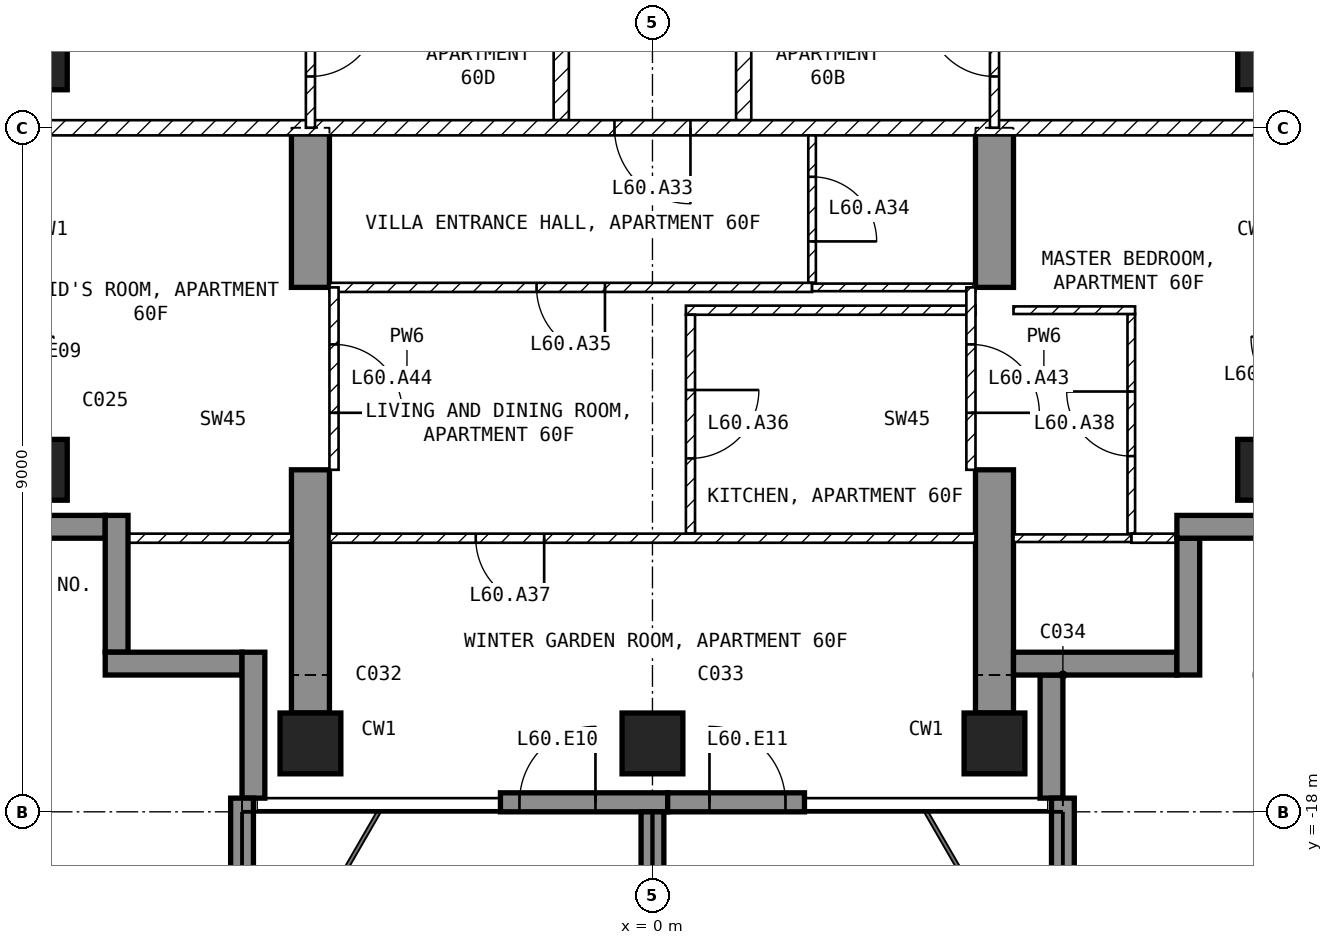
"""IFC4 building model, lengths in metres.
Left out: names, types, materials, properties, quantities, classifications, styles, units other than length and angle.
Written with IfcOpenShell. Run it as: python <this file> out.ifc"""

import sys

from ifc_helpers import new_model, si_unit, direction, frame, frame_2d, origin, origin_2d, place, context, subcontext, project, spatial, polyline, rectangle, outline, extrude, element, fill, save


model = new_model("IFC4")
c1 = context("Model", 3, precision=1e-05, world=origin(), true_north=direction((0.0, 1.0)))
c2 = subcontext(c1, "Body", "Model", "MODEL_VIEW")
j1 = project(units=[si_unit("LENGTHUNIT", "METRE"), si_unit("PLANEANGLEUNIT", "RADIAN")], contexts=[c1])
p1 = place(None, origin())
s1 = spatial("IfcSite", under=j1, at=p1, CompositionType="ELEMENT")
p2 = place(p1, origin())
s2 = spatial("IfcBuilding", under=s1, at=p2, CompositionType="ELEMENT")
p3 = place(p2, frame((0.0, 0.0, 239.5)))
s3 = spatial("IfcBuildingStorey", under=s2, at=p3, CompositionType="ELEMENT", Elevation=239.5)
for number, where, z_axis, x_axis in (
    (1, (-8.1, -13.5, -0.25), (0.0, 0.0, 1.0), (1.0, 0.0, 0.0)),
    (2, (-8.1, -8.1, -0.25), (0.0, 0.0, 1.0), (1.0, 0.0, 0.0)),
    (3, (-4.5, -17.1, -0.25), (0.0, 0.0, 1.0), (1.0, 0.0, 0.0)),
    (4, (0.0, -17.1, -0.25), (0.0, 0.0, 1.0), (1.0, 0.0, 0.0)),
    (5, (4.5, -17.1, -0.25), (0.0, 0.0, 1.0), (1.0, 0.0, 0.0)),
    (6, (8.1, -13.5, -0.25), (0.0, 0.0, 1.0), (1.0, 0.0, 0.0)),
    (7, (8.1, -8.1, -0.25), (0.0, 0.0, 1.0), (1.0, 0.0, 0.0)),
):
    element("IfcColumn", number, at=place(p3, frame(where, z_axis=z_axis, x_axis=x_axis)), inside=s3, PredefinedType="COLUMN", context=c2, shape_type="SweptSolid", body=[
        extrude(rectangle(XDim=0.8, YDim=0.8, at=origin_2d()), origin(), (0.0, 0.0, 1.0), 3.5),
    ])
for number, where, z_axis, x_axis in (
    (8, (-4.75, -16.7, -0.25), (1.0, 0.0, 0.0), (0.0, 1.0, 0.0)),
    (9, (4.25, -16.7, -0.25), (1.0, 0.0, 0.0), (0.0, 1.0, 0.0)),
):
    element("IfcWall", number, at=place(p3, frame(where, z_axis=z_axis, x_axis=x_axis)), inside=s3, PredefinedType="SHEAR", context=c2, shape_type="SweptSolid", body=[
        extrude(outline(polyline([(0.0, 0.0), (3.2, 0.0), (3.2, 2.65), (5.6, 2.65), (5.6, 0.0), (7.7, 0.0), (7.7, 3.5), (0.0, 3.5), (0.0, 0.0)])), origin(), (0.0, 0.0, 1.0), 0.5),
    ])
p4 = place(p3, frame((-2.0, -17.875, 0.0), z_axis=(0.0, 0.0, 1.0), x_axis=(1.0, 0.0, 0.0)))
e10 = element("IfcWall", 10, at=p4, inside=s3, PredefinedType="SOLIDWALL", context=c2, shape_type="SweptSolid", body=[
    extrude(rectangle(XDim=2.2, YDim=0.25, at=frame_2d((1.1, 0.0))), origin(), (0.0, 0.0, 1.0), 3.25),
])
p5 = place(p4, frame((0.25, 0.0, 0.0)))
e11 = element("IfcOpeningElement", 11, at=p5, cuts=e10, PredefinedType="OPENING", context=c2, shape_type="SweptSolid", body=[
    extrude(rectangle(XDim=1.0, YDim=2.4, at=frame_2d((0.5, 1.2))), frame((0.0, 0.135, 0.0), z_axis=(0.0, -1.0, 0.0), x_axis=(1.0, 0.0, 0.0)), (0.0, 0.0, 1.0), 0.27),
])
p6 = place(p3, frame((0.2, -17.875, 0.0), z_axis=(0.0, 0.0, 1.0), x_axis=(1.0, 0.0, 0.0)))
e12 = element("IfcWall", 12, at=p6, inside=s3, PredefinedType="SOLIDWALL", context=c2, shape_type="SweptSolid", body=[
    extrude(rectangle(XDim=1.8, YDim=0.25, at=frame_2d((0.9, 0.0))), origin(), (0.0, 0.0, 1.0), 3.25),
])
p7 = place(p6, frame((0.55, 0.0, 0.0)))
e13 = element("IfcOpeningElement", 13, at=p7, cuts=e12, PredefinedType="OPENING", context=c2, shape_type="SweptSolid", body=[
    extrude(rectangle(XDim=1.0, YDim=2.4, at=frame_2d((0.5, 1.2))), frame((0.0, 0.135, 0.0), z_axis=(0.0, -1.0, 0.0), x_axis=(1.0, 0.0, 0.0)), (0.0, 0.0, 1.0), 0.27),
])
p8 = place(p3, frame((5.25, -17.82, 0.0), z_axis=(0.0, 0.0, 1.0), x_axis=(0.0, 1.0, 0.0)))
e14 = element("IfcWall", 14, at=p8, inside=s3, PredefinedType="SOLIDWALL", context=c2, shape_type="SweptSolid", body=[
    extrude(rectangle(XDim=1.62, YDim=0.3, at=frame_2d((0.81, 0.0))), origin(), (0.0, 0.0, 1.0), 3.25),
])
p9 = place(p3, frame((4.75, -16.05, 0.0), z_axis=(0.0, 0.0, 1.0), x_axis=(1.0, 0.0, 0.0)))
e15 = element("IfcWall", 15, at=p9, inside=s3, PredefinedType="SOLIDWALL", context=c2, shape_type="SweptSolid", body=[
    extrude(rectangle(XDim=2.15, YDim=0.3, at=frame_2d((1.075, 0.0))), origin(), (0.0, 0.0, 1.0), 3.25),
])
p10 = place(p3, frame((7.05, -16.2, 0.0), z_axis=(0.0, 0.0, 1.0), x_axis=(0.0, 1.0, 0.0)))
e16 = element("IfcWall", 16, at=p10, inside=s3, PredefinedType="SOLIDWALL", context=c2, shape_type="SweptSolid", body=[
    extrude(rectangle(XDim=1.8, YDim=0.3, at=frame_2d((0.9, 0.0))), origin(), (0.0, 0.0, 1.0), 3.25),
])
p11 = place(p3, frame((6.9, -14.25, 0.0), z_axis=(0.0, 0.0, 1.0), x_axis=(1.0, 0.0, 0.0)))
e17 = element("IfcWall", 17, at=p11, inside=s3, PredefinedType="SOLIDWALL", context=c2, shape_type="SweptSolid", body=[
    extrude(rectangle(XDim=1.85, YDim=0.3, at=frame_2d((0.925, 0.0))), origin(), (0.0, 0.0, 1.0), 3.25),
])
p12 = place(p3, frame((-8.75, -14.25, 0.0), z_axis=(0.0, 0.0, 1.0), x_axis=(1.0, 0.0, 0.0)))
e18 = element("IfcWall", 18, at=p12, inside=s3, PredefinedType="SOLIDWALL", context=c2, shape_type="SweptSolid", body=[
    extrude(rectangle(XDim=1.55, YDim=0.3, at=frame_2d((0.775, 0.0))), origin(), (0.0, 0.0, 1.0), 3.25),
])
p13 = place(p3, frame((-7.05, -14.1, 0.0), z_axis=(0.0, 0.0, 1.0), x_axis=(0.0, -1.0, 0.0)))
e19 = element("IfcWall", 19, at=p13, inside=s3, PredefinedType="SOLIDWALL", context=c2, shape_type="SweptSolid", body=[
    extrude(rectangle(XDim=1.8, YDim=0.3, at=frame_2d((0.9, 0.0))), origin(), (0.0, 0.0, 1.0), 3.25),
])
p14 = place(p3, frame((-7.2, -16.05, 0.0), z_axis=(0.0, 0.0, 1.0), x_axis=(1.0, 0.0, 0.0)))
e20 = element("IfcWall", 20, at=p14, inside=s3, PredefinedType="SOLIDWALL", context=c2, shape_type="SweptSolid", body=[
    extrude(rectangle(XDim=1.8, YDim=0.3, at=frame_2d((0.9, 0.0))), origin(), (0.0, 0.0, 1.0), 3.25),
])
p15 = place(p3, frame((-5.25, -15.9, 0.0), z_axis=(0.0, 0.0, 1.0), x_axis=(0.0, -1.0, 0.0)))
e21 = element("IfcWall", 21, at=p15, inside=s3, PredefinedType="SOLIDWALL", context=c2, shape_type="SweptSolid", body=[
    extrude(rectangle(XDim=1.92, YDim=0.3, at=frame_2d((0.96, 0.0))), origin(), (0.0, 0.0, 1.0), 3.25),
])
p16 = place(p3, frame((-5.4, -17.82, 0.0), z_axis=(0.0, 0.0, 1.0), x_axis=(0.0, -1.0, 0.0)))
e22 = element("IfcWall", 22, at=p16, inside=s3, PredefinedType="SOLIDWALL", context=c2, shape_type="SweptSolid", body=[
    extrude(rectangle(XDim=2.88, YDim=0.3, at=frame_2d((1.44, 0.0))), origin(), (0.0, 0.0, 1.0), 3.25),
])
p17 = place(p3, frame((0.0, -18.0, 0.0), z_axis=(0.0, 0.0, 1.0), x_axis=(0.0, -1.0, 0.0)))
e23 = element("IfcWall", 23, at=p17, inside=s3, PredefinedType="SOLIDWALL", context=c2, shape_type="SweptSolid", body=[
    extrude(rectangle(XDim=2.7, YDim=0.3, at=frame_2d((1.35, 0.0))), origin(), (0.0, 0.0, 1.0), 3.25),
])
p18 = place(p3, frame((5.4, -17.82, 0.0), z_axis=(0.0, 0.0, 1.0), x_axis=(0.0, -1.0, 0.0)))
e24 = element("IfcWall", 24, at=p18, inside=s3, PredefinedType="SOLIDWALL", context=c2, shape_type="SweptSolid", body=[
    extrude(rectangle(XDim=2.88, YDim=0.3, at=frame_2d((1.44, 0.0))), origin(), (0.0, 0.0, 1.0), 3.25),
])
for number, where, z_axis, x_axis in (
    (25, (1.2, -4.6, 0.0), (0.0, 0.0, 1.0), (0.0, -1.0, 0.0)),
    (26, (-1.2, -8.9, 0.0), (0.0, 0.0, 1.0), (0.0, 1.0, 0.0)),
):
    element("IfcWall", number, at=place(p3, frame(where, z_axis=z_axis, x_axis=x_axis)), inside=s3, PredefinedType="PARTITIONING", context=c2, shape_type="SweptSolid", body=[
        extrude(rectangle(XDim=4.3, YDim=0.2, at=frame_2d((2.15, 0.0))), origin(), (0.0, 0.0, 1.0), 3.25),
    ])
p19 = place(p3, frame((8.92, -9.0, 0.0), z_axis=(0.0, 0.0, 1.0), x_axis=(-1.0, 0.0, 0.0)))
e27 = element("IfcWall", 27, at=p19, inside=s3, PredefinedType="PARTITIONING", context=c2, shape_type="SweptSolid", body=[
    extrude(rectangle(XDim=17.84, YDim=0.2, at=frame_2d((8.92, 0.0))), origin(), (0.0, 0.0, 1.0), 3.25),
])
p20 = place(p19, frame((8.42, 0.0, 0.0)))
e28 = element("IfcOpeningElement", 28, at=p20, cuts=e27, PredefinedType="OPENING", context=c2, shape_type="SweptSolid", body=[
    extrude(rectangle(XDim=1.0, YDim=2.1, at=frame_2d((0.5, 1.05))), frame((0.0, 0.11, 0.0), z_axis=(0.0, -1.0, 0.0), x_axis=(1.0, 0.0, 0.0)), (0.0, 0.0, 1.0), 0.22),
])
p21 = place(p3, frame((4.5, -9.0, 0.0), z_axis=(0.0, 0.0, 1.0), x_axis=(0.0, 1.0, 0.0)))
e29 = element("IfcWall", 29, at=p21, inside=s3, PredefinedType="PARTITIONING", context=c2, shape_type="SweptSolid", body=[
    extrude(rectangle(XDim=2.25, YDim=0.12, at=frame_2d((1.125, 0.0))), origin(), (0.0, 0.0, 1.0), 3.25),
])
p22 = place(p21, frame((0.675, 0.0, 0.0)))
e30 = element("IfcOpeningElement", 30, at=p22, cuts=e29, PredefinedType="OPENING", context=c2, shape_type="SweptSolid", body=[
    extrude(rectangle(XDim=0.9, YDim=2.1, at=frame_2d((0.45, 1.05))), frame((0.0, 0.07, 0.0), z_axis=(0.0, -1.0, 0.0), x_axis=(1.0, 0.0, 0.0)), (0.0, 0.0, 1.0), 0.14),
])
p23 = place(p3, frame((-4.5, -6.75, 0.0), z_axis=(0.0, 0.0, 1.0), x_axis=(0.0, -1.0, 0.0)))
e31 = element("IfcWall", 31, at=p23, inside=s3, PredefinedType="PARTITIONING", context=c2, shape_type="SweptSolid", body=[
    extrude(rectangle(XDim=2.25, YDim=0.12, at=frame_2d((1.125, 0.0))), origin(), (0.0, 0.0, 1.0), 3.25),
])
p24 = place(p23, frame((0.675, 0.0, 0.0)))
e32 = element("IfcOpeningElement", 32, at=p24, cuts=e31, PredefinedType="OPENING", context=c2, shape_type="SweptSolid", body=[
    extrude(rectangle(XDim=0.9, YDim=2.1, at=frame_2d((0.45, 1.05))), frame((0.0, 0.07, 0.0), z_axis=(0.0, -1.0, 0.0), x_axis=(1.0, 0.0, 0.0)), (0.0, 0.0, 1.0), 0.14),
])
p25 = place(p3, frame((2.1, -9.1, 0.0), z_axis=(0.0, 0.0, 1.0), x_axis=(0.0, -1.0, 0.0)))
e33 = element("IfcWall", 33, at=p25, inside=s3, PredefinedType="PARTITIONING", context=c2, shape_type="SweptSolid", body=[
    extrude(rectangle(XDim=1.94, YDim=0.1, at=frame_2d((0.97, 0.0))), origin(), (0.0, 0.0, 1.0), 3.25),
])
p26 = place(p25, frame((0.545, 0.0, 0.0)))
e34 = element("IfcOpeningElement", 34, at=p26, cuts=e33, PredefinedType="OPENING", context=c2, shape_type="SweptSolid", body=[
    extrude(rectangle(XDim=0.85, YDim=2.1, at=frame_2d((0.425, 1.05))), frame((0.0, 0.06, 0.0), z_axis=(0.0, -1.0, 0.0), x_axis=(1.0, 0.0, 0.0)), (0.0, 0.0, 1.0), 0.12),
])
p27 = place(p3, frame((2.1, -11.1, 0.0), z_axis=(0.0, 0.0, 1.0), x_axis=(-1.0, 0.0, 0.0)))
e35 = element("IfcWall", 35, at=p27, inside=s3, PredefinedType="PARTITIONING", context=c2, shape_type="SweptSolid", body=[
    extrude(rectangle(XDim=6.35, YDim=0.12, at=frame_2d((3.175, 0.0))), origin(), (0.0, 0.0, 1.0), 3.25),
])
p28 = place(p27, frame((2.725, 0.0, 0.0)))
e36 = element("IfcOpeningElement", 36, at=p28, cuts=e35, PredefinedType="OPENING", context=c2, shape_type="SweptSolid", body=[
    extrude(rectangle(XDim=0.9, YDim=2.1, at=frame_2d((0.45, 1.05))), frame((0.0, 0.07, 0.0), z_axis=(0.0, -1.0, 0.0), x_axis=(1.0, 0.0, 0.0)), (0.0, 0.0, 1.0), 0.14),
])
p29 = place(p3, frame((4.25, -11.1, 0.0), z_axis=(0.0, 0.0, 1.0), x_axis=(-1.0, 0.0, 0.0)))
e37 = element("IfcWall", 37, at=p29, inside=s3, PredefinedType="PARTITIONING", context=c2, shape_type="SweptSolid", body=[
    extrude(rectangle(XDim=2.15, YDim=0.1, at=frame_2d((1.075, 0.0))), origin(), (0.0, 0.0, 1.0), 3.25),
])
p30 = place(p3, frame((4.25, -11.4, 0.0), z_axis=(0.0, 0.0, 1.0), x_axis=(-1.0, 0.0, 0.0)))
e38 = element("IfcWall", 38, at=p30, inside=s3, PredefinedType="PARTITIONING", context=c2, shape_type="SweptSolid", body=[
    extrude(rectangle(XDim=3.81, YDim=0.12, at=frame_2d((1.905, 0.0))), origin(), (0.0, 0.0, 1.0), 3.25),
])
p31 = place(p3, frame((0.5, -11.46, 0.0), z_axis=(0.0, 0.0, 1.0), x_axis=(0.0, -1.0, 0.0)))
e39 = element("IfcWall", 39, at=p31, inside=s3, PredefinedType="PARTITIONING", context=c2, shape_type="SweptSolid", body=[
    extrude(rectangle(XDim=2.88, YDim=0.12, at=frame_2d((1.44, 0.0))), origin(), (0.0, 0.0, 1.0), 3.25),
])
p32 = place(p31, frame((0.99, 0.0, 0.0)))
e40 = element("IfcOpeningElement", 40, at=p32, cuts=e39, PredefinedType="OPENING", context=c2, shape_type="SweptSolid", body=[
    extrude(rectangle(XDim=0.9, YDim=2.1, at=frame_2d((0.45, 1.05))), frame((0.0, 0.07, 0.0), z_axis=(0.0, -1.0, 0.0), x_axis=(1.0, 0.0, 0.0)), (0.0, 0.0, 1.0), 0.14),
])
p33 = place(p3, frame((4.25, -14.4, 0.0), z_axis=(0.0, 0.0, 1.0), x_axis=(-1.0, 0.0, 0.0)))
e41 = element("IfcWall", 41, at=p33, inside=s3, PredefinedType="PARTITIONING", context=c2, shape_type="SweptSolid", body=[
    extrude(rectangle(XDim=8.5, YDim=0.12, at=frame_2d((4.25, 0.0))), origin(), (0.0, 0.0, 1.0), 3.25),
])
p34 = place(p33, frame((5.675, 0.0, 0.0)))
e42 = element("IfcOpeningElement", 42, at=p34, cuts=e41, PredefinedType="OPENING", context=c2, shape_type="SweptSolid", body=[
    extrude(rectangle(XDim=0.9, YDim=2.1, at=frame_2d((0.45, 1.05))), frame((0.0, 0.07, 0.0), z_axis=(0.0, -1.0, 0.0), x_axis=(1.0, 0.0, 0.0)), (0.0, 0.0, 1.0), 0.14),
])
p35 = place(p3, frame((6.3, -14.34, 0.0), z_axis=(0.0, 0.0, 1.0), x_axis=(0.0, 1.0, 0.0)))
e43 = element("IfcWall", 43, at=p35, inside=s3, PredefinedType="PARTITIONING", context=c2, shape_type="SweptSolid", body=[
    extrude(rectangle(XDim=2.89, YDim=0.1, at=frame_2d((1.445, 0.0))), origin(), (0.0, 0.0, 1.0), 3.25),
])
p36 = place(p35, frame((1.02, 0.0, 0.0)))
e44 = element("IfcOpeningElement", 44, at=p36, cuts=e43, PredefinedType="OPENING", context=c2, shape_type="SweptSolid", body=[
    extrude(rectangle(XDim=0.85, YDim=2.1, at=frame_2d((0.425, 1.05))), frame((0.0, 0.06, 0.0), z_axis=(0.0, -1.0, 0.0), x_axis=(1.0, 0.0, 0.0)), (0.0, 0.0, 1.0), 0.12),
])
p37 = place(p3, frame((6.35, -11.4, 0.0), z_axis=(0.0, 0.0, 1.0), x_axis=(-1.0, 0.0, 0.0)))
e45 = element("IfcWall", 45, at=p37, inside=s3, PredefinedType="PARTITIONING", context=c2, shape_type="SweptSolid", body=[
    extrude(rectangle(XDim=1.6, YDim=0.1, at=frame_2d((0.8, 0.0))), origin(), (0.0, 0.0, 1.0), 3.25),
])
p38 = place(p3, frame((7.12, -14.4, 0.0), z_axis=(0.0, 0.0, 1.0), x_axis=(-1.0, 0.0, 0.0)))
e46 = element("IfcWall", 46, at=p38, inside=s3, PredefinedType="PARTITIONING", context=c2, shape_type="SweptSolid", body=[
    extrude(rectangle(XDim=0.82, YDim=0.12, at=frame_2d((0.41, 0.0))), origin(), (0.0, 0.0, 1.0), 3.25),
])
p39 = place(p3, frame((6.3, -14.4, 0.0), z_axis=(0.0, 0.0, 1.0), x_axis=(-1.0, 0.0, 0.0)))
e47 = element("IfcWall", 47, at=p39, inside=s3, PredefinedType="PARTITIONING", context=c2, shape_type="SweptSolid", body=[
    extrude(rectangle(XDim=1.55, YDim=0.1, at=frame_2d((0.775, 0.0))), origin(), (0.0, 0.0, 1.0), 3.25),
])
p40 = place(p3, frame((-4.75, -14.4, 0.0), z_axis=(0.0, 0.0, 1.0), x_axis=(-1.0, 0.0, 0.0)))
e48 = element("IfcWall", 48, at=p40, inside=s3, PredefinedType="PARTITIONING", context=c2, shape_type="SweptSolid", body=[
    extrude(rectangle(XDim=2.37, YDim=0.12, at=frame_2d((1.185, 0.0))), origin(), (0.0, 0.0, 1.0), 3.25),
])
p41 = place(p3, frame((4.19, -11.1, 0.0), z_axis=(0.0, 0.0, 1.0), x_axis=(0.0, -1.0, 0.0)))
e49 = element("IfcWall", 49, at=p41, inside=s3, PredefinedType="PARTITIONING", context=c2, shape_type="SweptSolid", body=[
    extrude(rectangle(XDim=2.4, YDim=0.12, at=frame_2d((1.2, 0.0))), origin(), (0.0, 0.0, 1.0), 2.4),
])
p42 = place(p41, frame((0.75, 0.0, 0.0)))
e50 = element("IfcOpeningElement", 50, at=p42, cuts=e49, PredefinedType="OPENING", context=c2, shape_type="SweptSolid", body=[
    extrude(rectangle(XDim=0.9, YDim=2.1, at=frame_2d((0.45, 1.05))), frame((0.0, 0.07, 0.0), z_axis=(0.0, -1.0, 0.0), x_axis=(1.0, 0.0, 0.0)), (0.0, 0.0, 1.0), 0.14),
])
p43 = place(p3, frame((-4.19, -11.1, 0.0), z_axis=(0.0, 0.0, 1.0), x_axis=(0.0, -1.0, 0.0)))
e51 = element("IfcWall", 51, at=p43, inside=s3, PredefinedType="PARTITIONING", context=c2, shape_type="SweptSolid", body=[
    extrude(rectangle(XDim=2.4, YDim=0.12, at=frame_2d((1.2, 0.0))), origin(), (0.0, 0.0, 1.0), 2.4),
])
p44 = place(p43, frame((0.75, 0.0, 0.0)))
e52 = element("IfcOpeningElement", 52, at=p44, cuts=e51, PredefinedType="OPENING", context=c2, shape_type="SweptSolid", body=[
    extrude(rectangle(XDim=0.9, YDim=2.1, at=frame_2d((0.45, 1.05))), frame((0.0, 0.07, 0.0), z_axis=(0.0, -1.0, 0.0), x_axis=(1.0, 0.0, 0.0)), (0.0, 0.0, 1.0), 0.14),
])
p45 = place(p5, origin())
e53 = element("IfcDoor", 53, at=p45, inside=s3, OperationType="SINGLE_SWING_RIGHT", PredefinedType="DOOR", context=c2, shape_type="SweptSolid", body=[
    extrude(rectangle(XDim=1.0, YDim=2.4, at=frame_2d((0.5, 1.2))), frame((0.0, 0.025, 0.0), z_axis=(0.0, -1.0, 0.0), x_axis=(1.0, 0.0, 0.0)), (0.0, 0.0, 1.0), 0.05),
])
fill(e11, e53)
p46 = place(p7, origin())
e54 = element("IfcDoor", 54, at=p46, inside=s3, OperationType="SINGLE_SWING_LEFT", PredefinedType="DOOR", context=c2, shape_type="SweptSolid", body=[
    extrude(rectangle(XDim=1.0, YDim=2.4, at=frame_2d((0.5, 1.2))), frame((0.0, 0.025, 0.0), z_axis=(0.0, -1.0, 0.0), x_axis=(1.0, 0.0, 0.0)), (0.0, 0.0, 1.0), 0.05),
])
fill(e13, e54)
p47 = place(p22, origin())
e55 = element("IfcDoor", 55, at=p47, inside=s3, OperationType="SINGLE_SWING_RIGHT", PredefinedType="DOOR", context=c2, shape_type="SweptSolid", body=[
    extrude(rectangle(XDim=0.9, YDim=2.1, at=frame_2d((0.45, 1.05))), frame((0.0, 0.025, 0.0), z_axis=(0.0, -1.0, 0.0), x_axis=(1.0, 0.0, 0.0)), (0.0, 0.0, 1.0), 0.05),
])
fill(e30, e55)
p48 = place(p24, origin())
e56 = element("IfcDoor", 56, at=p48, inside=s3, OperationType="SINGLE_SWING_LEFT", PredefinedType="DOOR", context=c2, shape_type="SweptSolid", body=[
    extrude(rectangle(XDim=0.9, YDim=2.1, at=frame_2d((0.45, 1.05))), frame((0.0, 0.025, 0.0), z_axis=(0.0, -1.0, 0.0), x_axis=(1.0, 0.0, 0.0)), (0.0, 0.0, 1.0), 0.05),
])
fill(e32, e56)
p49 = place(p20, origin())
e57 = element("IfcDoor", 57, at=p49, inside=s3, OperationType="SINGLE_SWING_LEFT", PredefinedType="DOOR", context=c2, shape_type="SweptSolid", body=[
    extrude(rectangle(XDim=1.0, YDim=2.1, at=frame_2d((0.5, 1.05))), frame((0.0, 0.025, 0.0), z_axis=(0.0, -1.0, 0.0), x_axis=(1.0, 0.0, 0.0)), (0.0, 0.0, 1.0), 0.05),
])
fill(e28, e57)
p50 = place(p26, origin())
e58 = element("IfcDoor", 58, at=p50, inside=s3, OperationType="SINGLE_SWING_RIGHT", PredefinedType="DOOR", context=c2, shape_type="SweptSolid", body=[
    extrude(rectangle(XDim=0.85, YDim=2.1, at=frame_2d((0.425, 1.05))), frame((0.0, 0.025, 0.0), z_axis=(0.0, -1.0, 0.0), x_axis=(1.0, 0.0, 0.0)), (0.0, 0.0, 1.0), 0.05),
])
fill(e34, e58)
p51 = place(p28, origin())
e59 = element("IfcDoor", 59, at=p51, inside=s3, OperationType="SINGLE_SWING_LEFT", PredefinedType="DOOR", context=c2, shape_type="SweptSolid", body=[
    extrude(rectangle(XDim=0.9, YDim=2.1, at=frame_2d((0.45, 1.05))), frame((0.0, 0.025, 0.0), z_axis=(0.0, -1.0, 0.0), x_axis=(1.0, 0.0, 0.0)), (0.0, 0.0, 1.0), 0.05),
])
fill(e36, e59)
p52 = place(p32, origin())
e60 = element("IfcDoor", 60, at=p52, inside=s3, OperationType="SINGLE_SWING_LEFT", PredefinedType="DOOR", context=c2, shape_type="SweptSolid", body=[
    extrude(rectangle(XDim=0.9, YDim=2.1, at=frame_2d((0.45, 1.05))), frame((0.0, 0.025, 0.0), z_axis=(0.0, -1.0, 0.0), x_axis=(1.0, 0.0, 0.0)), (0.0, 0.0, 1.0), 0.05),
])
fill(e40, e60)
p53 = place(p34, origin())
e61 = element("IfcDoor", 61, at=p53, inside=s3, OperationType="SINGLE_SWING_LEFT", PredefinedType="DOOR", context=c2, shape_type="SweptSolid", body=[
    extrude(rectangle(XDim=0.9, YDim=2.1, at=frame_2d((0.45, 1.05))), frame((0.0, 0.025, 0.0), z_axis=(0.0, -1.0, 0.0), x_axis=(1.0, 0.0, 0.0)), (0.0, 0.0, 1.0), 0.05),
])
fill(e42, e61)
p54 = place(p36, origin())
e62 = element("IfcDoor", 62, at=p54, inside=s3, OperationType="SINGLE_SWING_RIGHT", PredefinedType="DOOR", context=c2, shape_type="SweptSolid", body=[
    extrude(rectangle(XDim=0.85, YDim=2.1, at=frame_2d((0.425, 1.05))), frame((0.0, 0.025, 0.0), z_axis=(0.0, -1.0, 0.0), x_axis=(1.0, 0.0, 0.0)), (0.0, 0.0, 1.0), 0.05),
])
fill(e44, e62)
p55 = place(p42, origin())
e63 = element("IfcDoor", 63, at=p55, inside=s3, OperationType="SINGLE_SWING_RIGHT", PredefinedType="DOOR", context=c2, shape_type="SweptSolid", body=[
    extrude(rectangle(XDim=0.9, YDim=2.1, at=frame_2d((0.45, 1.05))), frame((0.0, 0.025, 0.0), z_axis=(0.0, -1.0, 0.0), x_axis=(1.0, 0.0, 0.0)), (0.0, 0.0, 1.0), 0.05),
])
fill(e50, e63)
p56 = place(p44, origin())
e64 = element("IfcDoor", 64, at=p56, inside=s3, OperationType="SINGLE_SWING_RIGHT", PredefinedType="DOOR", context=c2, shape_type="SweptSolid", body=[
    extrude(rectangle(XDim=0.9, YDim=2.1, at=frame_2d((0.45, 1.05))), frame((0.0, 0.025, 0.0), z_axis=(0.0, -1.0, 0.0), x_axis=(1.0, 0.0, 0.0)), (0.0, 0.0, 1.0), 0.05),
])
fill(e52, e64)
save(model, sys.argv[1])
